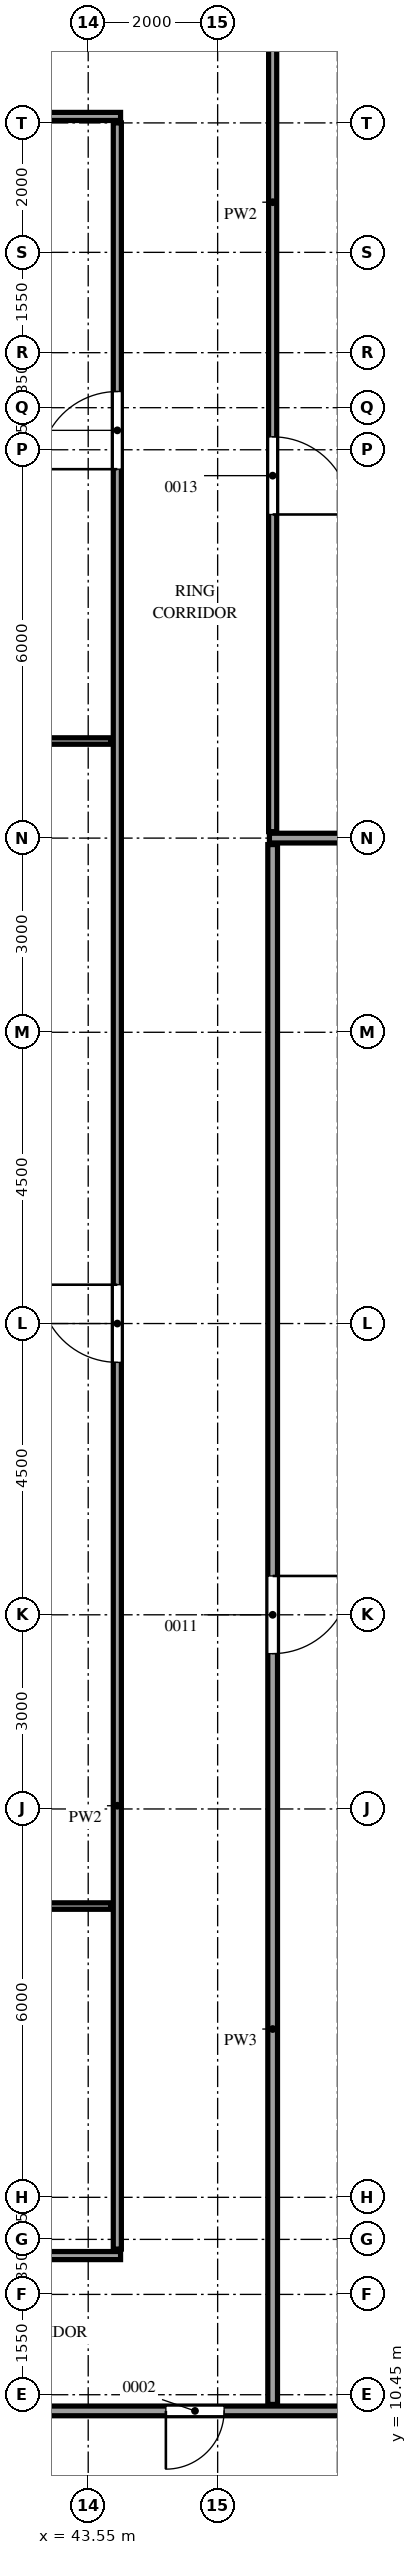
"""IFC4 building model, lengths in metres.
Left out: names, types, materials, properties, quantities, classifications, styles, units other than length and angle.
Written with IfcOpenShell. Run it as: python <this file> out.ifc"""

import sys

from ifc_helpers import new_model, si_unit, direction, frame, frame_2d, origin, place, context, subcontext, project, spatial, rectangle, extrude, source, transform, mapped, element, fill, save


model = new_model("IFC4")
c1 = context("Model", 3, precision=1e-05, world=origin(), true_north=direction((0.0, 1.0)))
c2 = subcontext(c1, "Body", "Model", "MODEL_VIEW")
j1 = project(units=[si_unit("LENGTHUNIT", "METRE"), si_unit("PLANEANGLEUNIT", "RADIAN")], contexts=[c1])
p1 = place(None, origin())
s1 = spatial("IfcSite", under=j1, at=p1, CompositionType="ELEMENT")
p2 = place(p1, origin())
s2 = spatial("IfcBuilding", under=s1, at=p2, CompositionType="ELEMENT")
p3 = place(p2, frame((0.0, 0.0, 141.1)))
s3 = spatial("IfcBuildingStorey", under=s2, at=p3, CompositionType="ELEMENT", Elevation=141.1)
m1 = source(origin(), c2, "Body", "SweptSolid", [
    extrude(rectangle(XDim=26.0, YDim=0.15, at=frame_2d((13.0, 0.0))), origin(), (0.0, 0.0, 1.0), 4.2),
])
p4 = place(p3, frame((26.35, 10.2, 0.0), z_axis=(0.0, 0.0, 1.0), x_axis=(1.0, 0.0, 0.0)))
e1 = element("IfcWall", 1, at=p4, inside=s3, PredefinedType="PARTITIONING", context=c2, shape_type="MappedRepresentation", body=[
    mapped(m1, transform((0.0, 0.0, 0.0))),
])
m2 = source(origin(), c2, "Body", "SweptSolid", [
    extrude(rectangle(XDim=1.2, YDim=2.1, at=frame_2d((0.6, 1.05))), frame((0.0, 0.085, 0.0), z_axis=(0.0, -1.0, 0.0), x_axis=(1.0, 0.0, 0.0)), (0.0, 0.0, 1.0), 0.17),
])
p5 = place(p4, frame((7.25, 0.0, 0.0)))
e2 = element("IfcOpeningElement", 2, at=p5, cuts=e1, PredefinedType="OPENING", context=c2, shape_type="MappedRepresentation", body=[
    mapped(m2, transform((0.0, 0.0, 0.0))),
])
m3 = source(origin(), c2, "Body", "SweptSolid", [
    extrude(rectangle(XDim=0.9, YDim=2.1, at=frame_2d((0.45, 1.05))), frame((0.0, 0.085, 0.0), z_axis=(0.0, -1.0, 0.0), x_axis=(1.0, 0.0, 0.0)), (0.0, 0.0, 1.0), 0.17),
])
p6 = place(p4, frame((18.4, 0.0, 0.0)))
e3 = element("IfcOpeningElement", 3, at=p6, cuts=e1, PredefinedType="OPENING", context=c2, shape_type="MappedRepresentation", body=[
    mapped(m3, transform((0.0, 0.0, 0.0))),
])
m4 = source(origin(), c2, "Body", "SweptSolid", [
    extrude(rectangle(XDim=24.1, YDim=0.15, at=frame_2d((12.05, 0.0))), origin(), (0.0, 0.0, 1.0), 4.2),
])
p7 = place(p3, frame((46.4, 10.3, 0.0), z_axis=(0.0, 0.0, 1.0), x_axis=(0.0, 1.0, 0.0)))
e4 = element("IfcWall", 4, at=p7, inside=s3, PredefinedType="PARTITIONING", context=c2, shape_type="MappedRepresentation", body=[
    mapped(m4, transform((0.0, 0.0, 0.0))),
])
p8 = place(p7, frame((11.6, 0.0, 0.0)))
e5 = element("IfcOpeningElement", 5, at=p8, cuts=e4, PredefinedType="OPENING", context=c2, shape_type="MappedRepresentation", body=[
    mapped(m2, transform((0.0, 0.0, 0.0))),
])
m5 = source(origin(), c2, "Body", "SweptSolid", [
    extrude(rectangle(XDim=17.7, YDim=0.125, at=frame_2d((8.85, 0.0))), origin(), (0.0, 0.0, 1.0), 4.2),
])
p9 = place(p3, frame((26.35, 12.6, 0.0), z_axis=(0.0, 0.0, 1.0), x_axis=(1.0, 0.0, 0.0)))
e6 = element("IfcWall", 6, at=p9, inside=s3, PredefinedType="PARTITIONING", context=c2, shape_type="MappedRepresentation", body=[
    mapped(m5, transform((0.0, 0.0, 0.0))),
])
m6 = source(origin(), c2, "Body", "SweptSolid", [
    extrude(rectangle(XDim=32.85, YDim=0.125, at=frame_2d((16.425, 0.0))), origin(), (0.0, 0.0, 1.0), 4.2),
])
p10 = place(p3, frame((44.0, 12.7, 0.0), z_axis=(0.0, 0.0, 1.0), x_axis=(0.0, 1.0, 0.0)))
e7 = element("IfcWall", 7, at=p10, inside=s3, PredefinedType="PARTITIONING", context=c2, shape_type="MappedRepresentation", body=[
    mapped(m6, transform((0.0, 0.0, 0.0))),
])
m7 = source(origin(), c2, "Body", "SweptSolid", [
    extrude(rectangle(XDim=1.2, YDim=2.1, at=frame_2d((0.6, 1.05))), frame((0.0, 0.073, 0.0), z_axis=(0.0, -1.0, 0.0), x_axis=(1.0, 0.0, 0.0)), (0.0, 0.0, 1.0), 0.145),
])
p11 = place(p10, frame((13.7, 0.0, 0.0)))
e8 = element("IfcOpeningElement", 8, at=p11, cuts=e7, PredefinedType="OPENING", context=c2, shape_type="MappedRepresentation", body=[
    mapped(m7, transform((0.0, 0.0, 0.0))),
])
p12 = place(p10, frame((27.5, 0.0, 0.0)))
e9 = element("IfcOpeningElement", 9, at=p12, cuts=e7, PredefinedType="OPENING", context=c2, shape_type="MappedRepresentation", body=[
    mapped(m7, transform((0.0, 0.0, 0.0))),
])
m8 = source(origin(), c2, "Body", "SweptSolid", [
    extrude(rectangle(XDim=17.4, YDim=0.1, at=frame_2d((8.7, 0.0))), origin(), (0.0, 0.0, 1.0), 4.2),
])
p13 = place(p3, frame((26.5, 18.0, 0.0), z_axis=(0.0, 0.0, 1.0), x_axis=(1.0, 0.0, 0.0)))
e10 = element("IfcWall", 10, at=p13, inside=s3, PredefinedType="PARTITIONING", context=c2, shape_type="MappedRepresentation", body=[
    mapped(m8, transform((0.0, 0.0, 0.0))),
])
m9 = source(origin(), c2, "Body", "SweptSolid", [
    extrude(rectangle(XDim=6.0, YDim=0.15, at=frame_2d((3.0, 0.0))), origin(), (0.0, 0.0, 1.0), 4.2),
])
p14 = place(p3, frame((46.35, 34.5, 0.0), z_axis=(0.0, 0.0, 1.0), x_axis=(1.0, 0.0, 0.0)))
e11 = element("IfcWall", 11, at=p14, inside=s3, PredefinedType="PARTITIONING", context=c2, shape_type="MappedRepresentation", body=[
    mapped(m9, transform((0.0, 0.0, 0.0))),
])
m10 = source(origin(), c2, "Body", "SweptSolid", [
    extrude(rectangle(XDim=13.35, YDim=0.125, at=frame_2d((6.675, 0.0))), origin(), (0.0, 0.0, 1.0), 4.2),
])
p15 = place(p3, frame((46.4, 34.6, 0.0), z_axis=(0.0, 0.0, 1.0), x_axis=(0.0, 1.0, 0.0)))
e12 = element("IfcWall", 12, at=p15, inside=s3, PredefinedType="PARTITIONING", context=c2, shape_type="MappedRepresentation", body=[
    mapped(m10, transform((0.0, 0.0, 0.0))),
])
p16 = place(p15, frame((4.9, 0.0, 0.0)))
e13 = element("IfcOpeningElement", 13, at=p16, cuts=e12, PredefinedType="OPENING", context=c2, shape_type="MappedRepresentation", body=[
    mapped(m7, transform((0.0, 0.0, 0.0))),
])
m11 = source(origin(), c2, "Body", "SweptSolid", [
    extrude(rectangle(XDim=13.35, YDim=0.1, at=frame_2d((6.675, 0.0))), origin(), (0.0, 0.0, 1.0), 4.2),
])
p17 = place(p3, frame((30.55, 36.0, 0.0), z_axis=(0.0, 0.0, 1.0), x_axis=(1.0, 0.0, 0.0)))
e14 = element("IfcWall", 14, at=p17, inside=s3, PredefinedType="PARTITIONING", context=c2, shape_type="MappedRepresentation", body=[
    mapped(m11, transform((0.0, 0.0, 0.0))),
])
m12 = source(origin(), c2, "Body", "SweptSolid", [
    extrude(rectangle(XDim=13.5, YDim=0.125, at=frame_2d((6.75, 0.0))), origin(), (0.0, 0.0, 1.0), 4.2),
])
p18 = place(p3, frame((30.55, 45.65, 0.0), z_axis=(0.0, 0.0, 1.0), x_axis=(1.0, 0.0, 0.0)))
e15 = element("IfcWall", 15, at=p18, inside=s3, PredefinedType="PARTITIONING", context=c2, shape_type="MappedRepresentation", body=[
    mapped(m12, transform((0.0, 0.0, 0.0))),
])
m13 = source(origin(), c2, "Body", "SweptSolid", [
    extrude(rectangle(XDim=0.9, YDim=2.1, at=frame_2d((0.45, 1.05))), frame((0.0, 0.025, 0.0), z_axis=(0.0, -1.0, 0.0), x_axis=(1.0, 0.0, 0.0)), (0.0, 0.0, 1.0), 0.05),
])
p19 = place(p6, origin())
e16 = element("IfcDoor", 16, at=p19, inside=s3, OperationType="SINGLE_SWING_LEFT", PredefinedType="DOOR", context=c2, shape_type="MappedRepresentation", body=[
    mapped(m13, transform((0.0, 0.0, 0.0))),
])
fill(e3, e16)
m14 = source(origin(), c2, "Body", "SweptSolid", [
    extrude(rectangle(XDim=1.2, YDim=2.1, at=frame_2d((0.6, 1.05))), frame((0.0, 0.025, 0.0), z_axis=(0.0, -1.0, 0.0), x_axis=(1.0, 0.0, 0.0)), (0.0, 0.0, 1.0), 0.05),
])
p20 = place(p11, origin())
e17 = element("IfcDoor", 17, at=p20, inside=s3, OperationType="SINGLE_SWING_LEFT", PredefinedType="DOOR", context=c2, shape_type="MappedRepresentation", body=[
    mapped(m14, transform((0.0, 0.0, 0.0))),
])
fill(e8, e17)
p21 = place(p12, origin())
e18 = element("IfcDoor", 18, at=p21, inside=s3, OperationType="SINGLE_SWING_RIGHT", PredefinedType="DOOR", context=c2, shape_type="MappedRepresentation", body=[
    mapped(m14, transform((0.0, 0.0, 0.0))),
])
fill(e9, e18)
p22 = place(p8, origin())
e19 = element("IfcDoor", 19, at=p22, inside=s3, OperationType="SINGLE_SWING_RIGHT", PredefinedType="DOOR", context=c2, shape_type="MappedRepresentation", body=[
    mapped(m14, transform((0.0, 0.0, 0.0))),
])
fill(e5, e19)
p23 = place(p16, origin())
e20 = element("IfcDoor", 20, at=p23, inside=s3, OperationType="SINGLE_SWING_LEFT", PredefinedType="DOOR", context=c2, shape_type="MappedRepresentation", body=[
    mapped(m14, transform((0.0, 0.0, 0.0))),
])
fill(e13, e20)
save(model, sys.argv[1])
